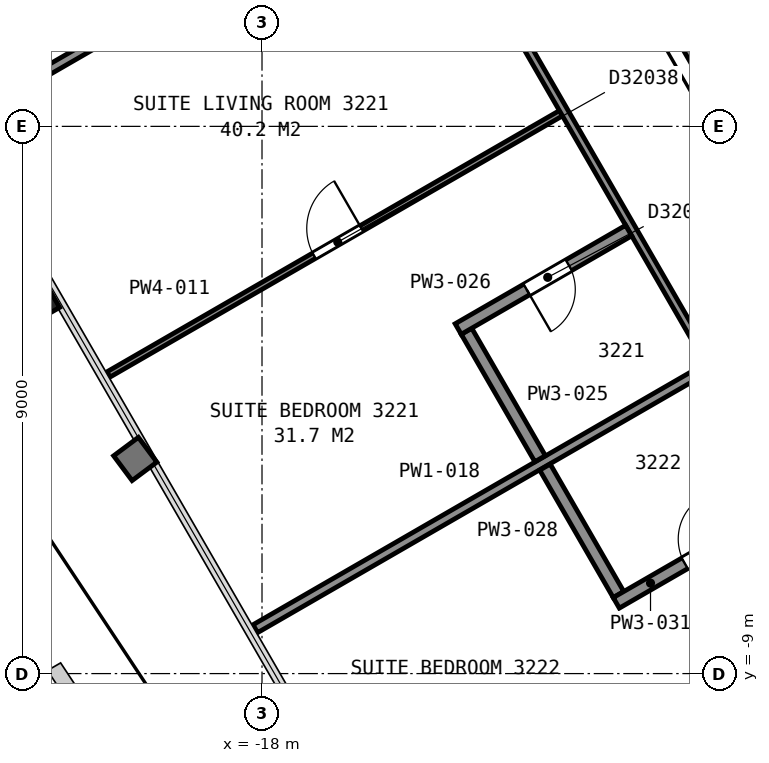
"""IFC4 building model, lengths in metres.
Left out: names, types, materials, properties, quantities, classifications, styles, units other than length and angle.
Written with IfcOpenShell. Run it as: python <this file> out.ifc"""

import sys

from ifc_helpers import new_model, si_unit, direction, frame, frame_2d, origin, origin_2d, place, context, subcontext, project, spatial, rectangle, i_section, extrude, element, fill, save


model = new_model("IFC4")
c1 = context("Model", 3, precision=1e-05, world=origin(), true_north=direction((0.0, 1.0)))
c2 = subcontext(c1, "Body", "Model", "MODEL_VIEW")
j1 = project(units=[si_unit("LENGTHUNIT", "METRE"), si_unit("PLANEANGLEUNIT", "RADIAN")], contexts=[c1])
p1 = place(None, origin())
s1 = spatial("IfcSite", under=j1, at=p1, CompositionType="ELEMENT")
p2 = place(p1, origin())
s2 = spatial("IfcBuilding", under=s1, at=p2, CompositionType="ELEMENT")
p3 = place(p2, frame((0.0, 0.0, 132.4)))
s3 = spatial("IfcBuildingStorey", under=s2, at=p3, CompositionType="ELEMENT", Elevation=132.4)
p4 = place(p3, frame((-21.63, -2.91, 0.04), z_axis=(0.0, 0.0, 1.0), x_axis=(-0.5, 0.866025403784, 0.0)))
e1 = element("IfcColumn", 1, at=p4, inside=s3, PredefinedType="COLUMN", context=c2, shape_type="SweptSolid", body=[
    extrude(i_section(OverallWidth=0.419, OverallDepth=0.455, WebThickness=0.042, FlangeThickness=0.068, FilletRadius=0.015, at=origin_2d()), origin(), (0.0, 0.0, 1.0), 3.56),
])
p5 = place(p3, frame((-13.664, 5.946, 0.0), z_axis=(0.0, 0.0, 1.0), x_axis=(0.499994327219, -0.866028678941, 0.0)))
e2 = element("IfcWall", 2, at=p5, inside=s3, PredefinedType="PARTITIONING", context=c2, shape_type="SweptSolid", body=[
    extrude(rectangle(XDim=23.968, YDim=0.2, at=frame_2d((11.984, 0.0))), origin(), (0.0, 0.0, 1.0), 3.35),
])
p6 = place(p3, frame((-22.939, 0.102, 0.0), z_axis=(0.0, 0.0, 1.0), x_axis=(0.866041729639, 0.499971721724, 0.0)))
e3 = element("IfcWall", 3, at=p6, inside=s3, PredefinedType="PARTITIONING", context=c2, shape_type="SweptSolid", body=[
    extrude(rectangle(XDim=8.591, YDim=0.15, at=frame_2d((4.296, 0.0))), origin(), (0.0, 0.0, 1.0), 2.613),
])
p7 = place(p3, frame((-13.084, 0.216, 0.0), z_axis=(0.0, 0.0, 1.0), x_axis=(-0.866017120224, -0.500014347272, 0.0)))
e4 = element("IfcWall", 4, at=p7, inside=s3, PredefinedType="PARTITIONING", context=c2, shape_type="SweptSolid", body=[
    extrude(rectangle(XDim=8.592, YDim=0.1, at=frame_2d((4.296, 0.0))), origin(), (0.0, 0.0, 1.0), 2.613),
])
p8 = place(p7, frame((3.788, 0.0, 0.0)))
e5 = element("IfcOpeningElement", 5, at=p8, cuts=e4, PredefinedType="OPENING", context=c2, shape_type="SweptSolid", body=[
    extrude(rectangle(XDim=0.9, YDim=2.1, at=frame_2d((0.45, 1.05))), frame((0.0, 0.06, 0.0), z_axis=(0.0, -1.0, 0.0), x_axis=(1.0, 0.0, 0.0)), (0.0, 0.0, 1.0), 0.12),
])
p9 = place(p3, frame((-18.11, -8.262, 0.0), z_axis=(0.0, 0.0, 1.0), x_axis=(0.866034625887, 0.499984026509, 0.0)))
e6 = element("IfcWall", 6, at=p9, inside=s3, PredefinedType="PARTITIONING", context=c2, shape_type="SweptSolid", body=[
    extrude(rectangle(XDim=8.591, YDim=0.15, at=frame_2d((4.295, 0.0))), origin(), (0.0, 0.0, 1.0), 2.613),
])
p10 = place(p3, frame((-3.756, -15.816, 0.0), z_axis=(0.0, 0.0, 1.0), x_axis=(-0.499992829944, 0.866029543379, 0.0)))
e7 = element("IfcWall", 7, at=p10, inside=s3, PredefinedType="PARTITIONING", context=c2, shape_type="SweptSolid", body=[
    extrude(rectangle(XDim=24.413, YDim=0.125, at=frame_2d((12.207, 0.0))), origin(), (0.0, 0.0, 1.0), 2.613),
])
p11 = place(p10, frame((20.478, 0.0, 0.0)))
e8 = element("IfcOpeningElement", 8, at=p11, cuts=e7, PredefinedType="OPENING", context=c2, shape_type="SweptSolid", body=[
    extrude(rectangle(XDim=1.0, YDim=2.1, at=frame_2d((0.5, 1.05))), frame((0.0, 0.073, 0.0), z_axis=(0.0, -1.0, 0.0), x_axis=(1.0, 0.0, 0.0)), (0.0, 0.0, 1.0), 0.145),
])
p12 = place(p10, frame((5.99, 0.0, 0.0)))
e9 = element("IfcOpeningElement", 9, at=p12, cuts=e7, PredefinedType="OPENING", context=c2, shape_type="SweptSolid", body=[
    extrude(rectangle(XDim=1.0, YDim=2.1, at=frame_2d((0.5, 1.05))), frame((0.0, 0.073, 0.0), z_axis=(0.0, -1.0, 0.0), x_axis=(1.0, 0.0, 0.0)), (0.0, 0.0, 1.0), 0.145),
])
p13 = place(p10, frame((1.561, 0.0, 0.0)))
e10 = element("IfcOpeningElement", 10, at=p13, cuts=e7, PredefinedType="OPENING", context=c2, shape_type="SweptSolid", body=[
    extrude(rectangle(XDim=1.0, YDim=2.1, at=frame_2d((0.5, 1.05))), frame((0.0, 0.073, 0.0), z_axis=(0.0, -1.0, 0.0), x_axis=(1.0, 0.0, 0.0)), (0.0, 0.0, 1.0), 0.145),
])
p14 = place(p3, frame((-15.696, -12.444, 0.0), z_axis=(0.0, 0.0, 1.0), x_axis=(0.866024224461, 0.500002042643, 0.0)))
e11 = element("IfcWall", 11, at=p14, inside=s3, PredefinedType="PARTITIONING", context=c2, shape_type="SweptSolid", body=[
    extrude(rectangle(XDim=8.592, YDim=0.1, at=frame_2d((4.296, 0.0))), origin(), (0.0, 0.0, 1.0), 2.613),
])
p15 = place(p14, frame((3.904, 0.0, 0.0)))
e12 = element("IfcOpeningElement", 12, at=p15, cuts=e11, PredefinedType="OPENING", context=c2, shape_type="SweptSolid", body=[
    extrude(rectangle(XDim=0.9, YDim=2.1, at=frame_2d((0.45, 1.05))), frame((0.0, 0.06, 0.0), z_axis=(0.0, -1.0, 0.0), x_axis=(1.0, 0.0, 0.0)), (0.0, 0.0, 1.0), 0.12),
])
p16 = place(p3, frame((-14.637, -3.37, 0.0), z_axis=(0.0, 0.0, 1.0), x_axis=(0.50002218001, -0.866012597771, 0.0)))
e13 = element("IfcWall", 13, at=p16, inside=s3, PredefinedType="PARTITIONING", context=c2, shape_type="SweptSolid", body=[
    extrude(rectangle(XDim=2.421, YDim=0.2, at=frame_2d((1.21, 0.0))), origin(), (0.0, 0.0, 1.0), 2.613),
])
p17 = place(p3, frame((-11.97, -1.714, 0.0), z_axis=(0.0, 0.0, 1.0), x_axis=(-0.866016035791, -0.500016225489, 0.0)))
e14 = element("IfcWall", 14, at=p17, inside=s3, PredefinedType="PARTITIONING", context=c2, shape_type="SweptSolid", body=[
    extrude(rectangle(XDim=3.237, YDim=0.2, at=frame_2d((1.619, 0.0))), origin(), (0.0, 0.0, 1.0), 2.613),
])
p18 = place(p17, frame((1.137, 0.0, 0.0)))
e15 = element("IfcOpeningElement", 15, at=p18, cuts=e14, PredefinedType="OPENING", context=c2, shape_type="SweptSolid", body=[
    extrude(rectangle(XDim=0.8, YDim=2.1, at=frame_2d((0.4, 1.05))), frame((0.0, 0.11, 0.0), z_axis=(0.0, -1.0, 0.0), x_axis=(1.0, 0.0, 0.0)), (0.0, 0.0, 1.0), 0.22),
])
p19 = place(p3, frame((-13.346, -5.604, 0.0), z_axis=(0.0, 0.0, 1.0), x_axis=(0.499719542643, -0.866187265377, 0.0)))
e16 = element("IfcWall", 16, at=p19, inside=s3, PredefinedType="PARTITIONING", context=c2, shape_type="SweptSolid", body=[
    extrude(rectangle(XDim=2.42, YDim=0.2, at=frame_2d((1.21, 0.0))), origin(), (0.0, 0.0, 1.0), 2.613),
])
p20 = place(p3, frame((-12.174, -7.837, 0.0), z_axis=(0.0, 0.0, 1.0), x_axis=(0.866016035791, 0.500016225489, 0.0)))
e17 = element("IfcWall", 17, at=p20, inside=s3, PredefinedType="PARTITIONING", context=c2, shape_type="SweptSolid", body=[
    extrude(rectangle(XDim=3.237, YDim=0.2, at=frame_2d((1.619, 0.0))), origin(), (0.0, 0.0, 1.0), 2.613),
])
p21 = place(p20, frame((1.3, 0.0, 0.0)))
e18 = element("IfcOpeningElement", 18, at=p21, cuts=e17, PredefinedType="OPENING", context=c2, shape_type="SweptSolid", body=[
    extrude(rectangle(XDim=0.8, YDim=2.1, at=frame_2d((0.4, 1.05))), frame((0.0, 0.11, 0.0), z_axis=(0.0, -1.0, 0.0), x_axis=(1.0, 0.0, 0.0)), (0.0, 0.0, 1.0), 0.22),
])
p22 = place(p8, origin())
e19 = element("IfcDoor", 19, at=p22, inside=s3, OperationType="SINGLE_SWING_LEFT", PredefinedType="DOOR", context=c2, shape_type="SweptSolid", body=[
    extrude(rectangle(XDim=0.9, YDim=2.1, at=frame_2d((0.45, 1.05))), frame((0.0, 0.025, 0.0), z_axis=(0.0, -1.0, 0.0), x_axis=(1.0, 0.0, 0.0)), (0.0, 0.0, 1.0), 0.05),
])
fill(e5, e19)
p23 = place(p18, origin())
e20 = element("IfcDoor", 20, at=p23, inside=s3, OperationType="SINGLE_SWING_RIGHT", PredefinedType="DOOR", context=c2, shape_type="SweptSolid", body=[
    extrude(rectangle(XDim=0.8, YDim=2.1, at=frame_2d((0.4, 1.05))), frame((0.0, 0.025, 0.0), z_axis=(0.0, -1.0, 0.0), x_axis=(1.0, 0.0, 0.0)), (0.0, 0.0, 1.0), 0.05),
])
fill(e15, e20)
p24 = place(p21, origin())
e21 = element("IfcDoor", 21, at=p24, inside=s3, OperationType="SINGLE_SWING_RIGHT", PredefinedType="DOOR", context=c2, shape_type="SweptSolid", body=[
    extrude(rectangle(XDim=0.8, YDim=2.1, at=frame_2d((0.4, 1.05))), frame((0.0, 0.025, 0.0), z_axis=(0.0, -1.0, 0.0), x_axis=(1.0, 0.0, 0.0)), (0.0, 0.0, 1.0), 0.05),
])
fill(e18, e21)
save(model, sys.argv[1])
